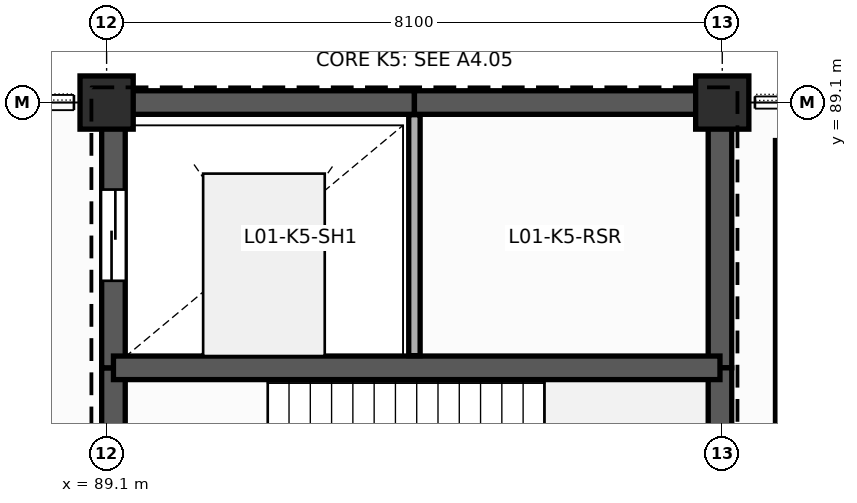
"""IFC4 building model, lengths in metres.
Left out: names, types, materials, properties, quantities, classifications, styles, units other than length and angle.
Written with IfcOpenShell. Run it as: python <this file> out.ifc"""

import sys

from ifc_helpers import new_model, si_unit, direction, frame, frame_2d, origin, origin_2d, place, context, subcontext, project, spatial, rectangle, extrude, element, fill, save


model = new_model("IFC4")
c1 = context("Model", 3, precision=1e-05, world=origin(), true_north=direction((0.0, 1.0)))
c2 = subcontext(c1, "Body", "Model", "MODEL_VIEW")
j1 = project(units=[si_unit("LENGTHUNIT", "METRE"), si_unit("PLANEANGLEUNIT", "RADIAN")], contexts=[c1])
p1 = place(None, origin())
s1 = spatial("IfcSite", under=j1, at=p1, CompositionType="ELEMENT")
p2 = place(p1, origin())
s2 = spatial("IfcBuilding", under=s1, at=p2, CompositionType="ELEMENT")
p3 = place(p2, frame((0.0, 0.0, 5.4)))
s3 = spatial("IfcBuildingStorey", under=s2, at=p3, CompositionType="ELEMENT", Elevation=5.4)
for number, where, z_axis, x_axis in (
    (1, (89.1, 89.1, 0.0), (0.0, 0.0, 1.0), (1.0, 0.0, 0.0)),
    (2, (97.2, 89.1, 0.0), (0.0, 0.0, 1.0), (1.0, 0.0, 0.0)),
):
    element("IfcColumn", number, at=place(p3, frame(where, z_axis=z_axis, x_axis=x_axis)), inside=s3, PredefinedType="COLUMN", context=c2, shape_type="SweptSolid", body=[
        extrude(rectangle(XDim=0.7, YDim=0.7, at=origin_2d()), origin(), (0.0, 0.0, 1.0), 4.8),
    ])
p4 = place(p3, frame((89.19, 81.25, 0.0), z_axis=(0.0, 0.0, 1.0), x_axis=(0.0, 1.0, 0.0)))
e3 = element("IfcWall", 3, at=p4, inside=s3, PredefinedType="SHEAR", context=c2, shape_type="SweptSolid", body=[
    extrude(rectangle(XDim=4.36, YDim=0.31, at=frame_2d((2.18, 0.0))), origin(), (0.0, 0.0, 1.0), 4.8),
])
p5 = place(p4, frame((1.35, 0.0, 0.0)))
e4 = element("IfcOpeningElement", 4, at=p5, cuts=e3, PredefinedType="OPENING", context=c2, shape_type="SweptSolid", body=[
    extrude(rectangle(XDim=1.2, YDim=2.25, at=frame_2d((0.6, 1.125))), frame((0.0, 0.165, 0.0), z_axis=(0.0, -1.0, 0.0), x_axis=(1.0, 0.0, 0.0)), (0.0, 0.0, 1.0), 0.33),
])
p6 = place(p3, frame((89.19, 85.61, 0.0), z_axis=(0.0, 0.0, 1.0), x_axis=(0.0, 1.0, 0.0)))
e5 = element("IfcWall", 5, at=p6, inside=s3, PredefinedType="SHEAR", context=c2, shape_type="SweptSolid", body=[
    extrude(rectangle(XDim=3.49, YDim=0.31, at=frame_2d((1.745, 0.0))), origin(), (0.0, 0.0, 1.0), 4.8),
])
p7 = place(p6, frame((1.145, 0.0, 0.0)))
e6 = element("IfcOpeningElement", 6, at=p7, cuts=e5, PredefinedType="OPENING", context=c2, shape_type="SweptSolid", body=[
    extrude(rectangle(XDim=1.2, YDim=2.2, at=frame_2d((0.6, 1.1))), frame((0.0, 0.165, 0.0), z_axis=(0.0, -1.0, 0.0), x_axis=(1.0, 0.0, 0.0)), (0.0, 0.0, 1.0), 0.33),
])
p8 = place(p3, frame((89.19, 89.1, 0.0), z_axis=(0.0, 0.0, 1.0), x_axis=(1.0, 0.0, 0.0)))
e7 = element("IfcWall", 7, at=p8, inside=s3, PredefinedType="SHEAR", context=c2, shape_type="SweptSolid", body=[
    extrude(rectangle(XDim=3.96, YDim=0.31, at=frame_2d((1.98, 0.0))), origin(), (0.0, 0.0, 1.0), 4.8),
])
p9 = place(p3, frame((93.15, 89.1, 0.0), z_axis=(0.0, 0.0, 1.0), x_axis=(1.0, 0.0, 0.0)))
e8 = element("IfcWall", 8, at=p9, inside=s3, PredefinedType="SHEAR", context=c2, shape_type="SweptSolid", body=[
    extrude(rectangle(XDim=4.02, YDim=0.31, at=frame_2d((2.01, 0.0))), origin(), (0.0, 0.0, 1.0), 4.8),
])
p10 = place(p3, frame((97.17, 89.1, 0.0), z_axis=(0.0, 0.0, 1.0), x_axis=(0.0, -1.0, 0.0)))
e9 = element("IfcWall", 9, at=p10, inside=s3, PredefinedType="SHEAR", context=c2, shape_type="SweptSolid", body=[
    extrude(rectangle(XDim=3.49, YDim=0.31, at=frame_2d((1.745, 0.0))), origin(), (0.0, 0.0, 1.0), 4.8),
])
p11 = place(p3, frame((97.17, 85.61, 0.0), z_axis=(0.0, 0.0, 1.0), x_axis=(0.0, -1.0, 0.0)))
e10 = element("IfcWall", 10, at=p11, inside=s3, PredefinedType="SHEAR", context=c2, shape_type="SweptSolid", body=[
    extrude(rectangle(XDim=4.36, YDim=0.31, at=frame_2d((2.18, 0.0))), origin(), (0.0, 0.0, 1.0), 4.8),
])
p12 = place(p3, frame((89.19, 85.61, 0.0), z_axis=(0.0, 0.0, 1.0), x_axis=(1.0, 0.0, 0.0)))
e11 = element("IfcWall", 11, at=p12, inside=s3, PredefinedType="SHEAR", context=c2, shape_type="SweptSolid", body=[
    extrude(rectangle(XDim=7.98, YDim=0.31, at=frame_2d((3.99, 0.0))), origin(), (0.0, 0.0, 1.0), 4.8),
])
p13 = place(p3, frame((93.15, 85.77, 0.0), z_axis=(0.0, 0.0, 1.0), x_axis=(0.0, 1.0, 0.0)))
e12 = element("IfcWall", 12, at=p13, inside=s3, PredefinedType="PLUMBINGWALL", context=c2, shape_type="SweptSolid", body=[
    extrude(rectangle(XDim=3.17, YDim=0.15, at=frame_2d((1.585, 0.0))), origin(), (0.0, 0.0, 1.0), 4.45),
])
p14 = place(p3, frame((98.0, 81.4, 0.0), z_axis=(0.0, 0.0, 1.0), x_axis=(0.0, 1.0, 0.0)))
e13 = element("IfcWall", 13, at=p14, inside=s3, PredefinedType="PARTITIONING", context=c2, shape_type="SweptSolid", body=[
    extrude(rectangle(XDim=7.2, YDim=0.2, at=frame_2d((3.6, 0.0))), origin(), (0.0, 0.0, 1.0), 4.52),
])
p15 = place(p7, origin())
e14 = element("IfcDoor", 14, at=p15, inside=s3, OperationType="SLIDING_TO_LEFT", PredefinedType="DOOR", context=c2, shape_type="SweptSolid", body=[
    extrude(rectangle(XDim=1.2, YDim=2.2, at=frame_2d((0.6, 1.1))), frame((0.0, 0.025, 0.0), z_axis=(0.0, -1.0, 0.0), x_axis=(1.0, 0.0, 0.0)), (0.0, 0.0, 1.0), 0.05),
])
fill(e6, e14)
save(model, sys.argv[1])
